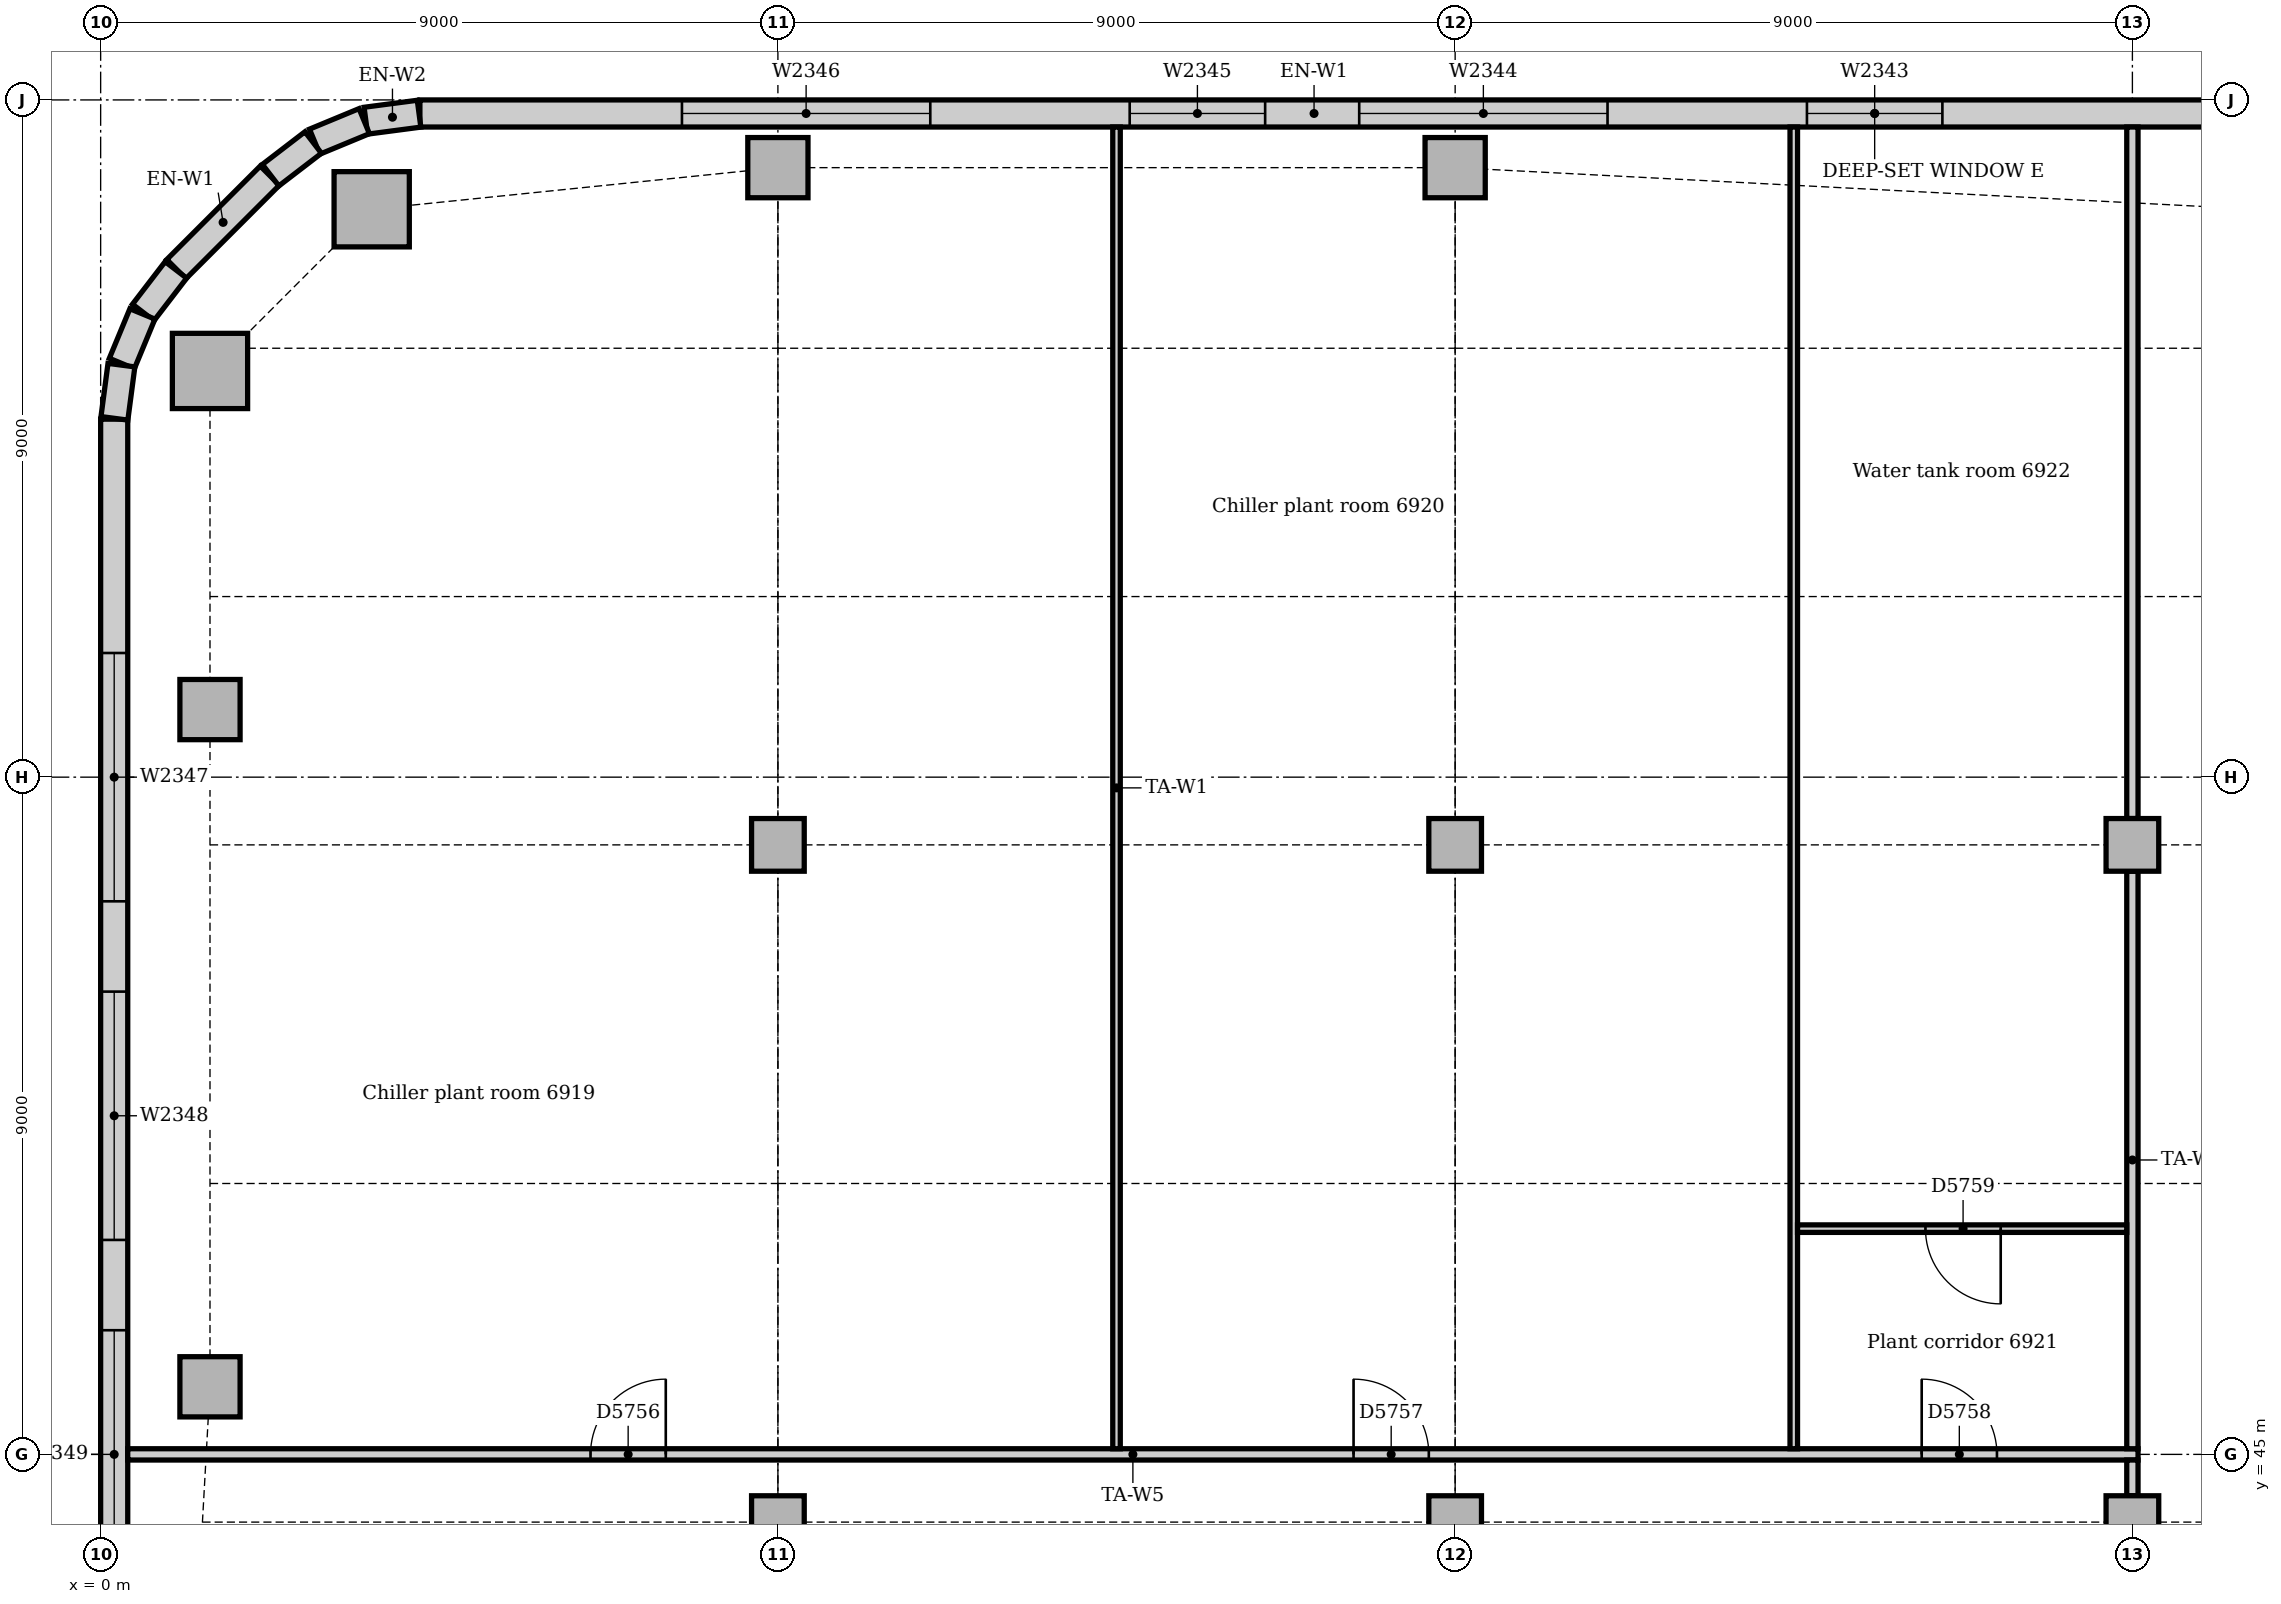
"""IFC4 building model, lengths in metres.
Left out: names, types, materials, properties, quantities, classifications, styles, units other than length and angle.
Written with IfcOpenShell. Run it as: python <this file> out.ifc"""

import sys

from ifc_helpers import new_model, si_unit, direction, frame, frame_2d, origin, origin_2d, place, context, subcontext, project, spatial, rectangle, extrude, element, fill, save


model = new_model("IFC4")
c1 = context("Model", 3, precision=1e-05, world=origin(), true_north=direction((0.0, 1.0)))
c2 = subcontext(c1, "Body", "Model", "MODEL_VIEW")
j1 = project(units=[si_unit("LENGTHUNIT", "METRE"), si_unit("PLANEANGLEUNIT", "RADIAN")], contexts=[c1])
p1 = place(None, origin())
s1 = spatial("IfcSite", under=j1, at=p1, CompositionType="ELEMENT")
p2 = place(p1, origin())
s2 = spatial("IfcBuilding", under=s1, at=p2, CompositionType="ELEMENT")
p3 = place(p2, frame((0.0, 0.0, 291.0)))
s3 = spatial("IfcBuildingStorey", under=s2, at=p3, CompositionType="ELEMENT", Elevation=291.0)
for number, where, z_axis, x_axis in (
    (1, (3.602, 61.547, 0.0), (0.0, 0.0, 1.0), (1.0, 0.0, 0.0)),
    (2, (1.453, 59.398, 0.0), (0.0, 0.0, 1.0), (1.0, 0.0, 0.0)),
):
    element("IfcColumn", number, at=place(p3, frame(where, z_axis=z_axis, x_axis=x_axis)), inside=s3, PredefinedType="COLUMN", context=c2, shape_type="SweptSolid", body=[
        extrude(rectangle(XDim=1.0, YDim=1.0, at=origin_2d()), origin(), (0.0, 0.0, 1.0), 6.55),
    ])
for number, where, z_axis, x_axis in (
    (3, (9.0, 62.1, 0.0), (0.0, 0.0, 1.0), (1.0, 0.0, 0.0)),
    (4, (18.0, 62.1, 0.0), (0.0, 0.0, 1.0), (1.0, 0.0, 0.0)),
    (5, (1.453, 45.898, 0.0), (0.0, 0.0, 1.0), (1.0, 0.0, 0.0)),
    (6, (1.453, 54.898, 0.0), (0.0, 0.0, 1.0), (1.0, 0.0, 0.0)),
):
    element("IfcColumn", number, at=place(p3, frame(where, z_axis=z_axis, x_axis=x_axis)), inside=s3, PredefinedType="COLUMN", context=c2, shape_type="SweptSolid", body=[
        extrude(rectangle(XDim=0.8, YDim=0.8, at=origin_2d()), origin(), (0.0, 0.0, 1.0), 6.55),
    ])
for number, where, z_axis, x_axis in (
    (7, (9.0, 44.1, 0.0), (0.0, 0.0, 1.0), (1.0, 0.0, 0.0)),
    (8, (9.0, 53.1, 0.0), (0.0, 0.0, 1.0), (1.0, 0.0, 0.0)),
    (9, (18.0, 44.1, 0.0), (0.0, 0.0, 1.0), (1.0, 0.0, 0.0)),
    (10, (18.0, 53.1, 0.0), (0.0, 0.0, 1.0), (1.0, 0.0, 0.0)),
    (11, (27.0, 44.1, 0.0), (0.0, 0.0, 1.0), (1.0, 0.0, 0.0)),
    (12, (27.0, 53.1, 0.0), (0.0, 0.0, 1.0), (1.0, 0.0, 0.0)),
):
    element("IfcColumn", number, at=place(p3, frame(where, z_axis=z_axis, x_axis=x_axis)), inside=s3, PredefinedType="COLUMN", context=c2, shape_type="SweptSolid", body=[
        extrude(rectangle(XDim=0.7, YDim=0.7, at=origin_2d()), origin(), (0.0, 0.0, 1.0), 6.55),
    ])
p4 = place(p3, frame((28.007, 62.82, 0.0), z_axis=(0.0, 0.0, 1.0), x_axis=(-1.0, 0.0, 0.0)))
e13 = element("IfcWall", 13, at=p4, inside=s3, PredefinedType="STANDARD", context=c2, shape_type="SweptSolid", body=[
    extrude(rectangle(XDim=23.765, YDim=0.36, at=frame_2d((11.882, 0.0))), origin(), (0.0, 0.0, 1.0), 6.55),
])
p5 = place(p4, frame((3.532, 0.0, 0.9)))
e14 = element("IfcOpeningElement", 14, at=p5, cuts=e13, PredefinedType="OPENING", context=c2, shape_type="SweptSolid", body=[
    extrude(rectangle(XDim=1.8, YDim=2.2, at=frame_2d((0.9, 1.1))), frame((0.0, 0.19, 0.0), z_axis=(0.0, -1.0, 0.0), x_axis=(1.0, 0.0, 0.0)), (0.0, 0.0, 1.0), 0.38),
])
p6 = place(p4, frame((7.982, 0.0, 0.9)))
e15 = element("IfcOpeningElement", 15, at=p6, cuts=e13, PredefinedType="OPENING", context=c2, shape_type="SweptSolid", body=[
    extrude(rectangle(XDim=3.3, YDim=2.2, at=frame_2d((1.65, 1.1))), frame((0.0, 0.19, 0.0), z_axis=(0.0, -1.0, 0.0), x_axis=(1.0, 0.0, 0.0)), (0.0, 0.0, 1.0), 0.38),
])
p7 = place(p4, frame((12.532, 0.0, 0.9)))
e16 = element("IfcOpeningElement", 16, at=p7, cuts=e13, PredefinedType="OPENING", context=c2, shape_type="SweptSolid", body=[
    extrude(rectangle(XDim=1.8, YDim=2.2, at=frame_2d((0.9, 1.1))), frame((0.0, 0.19, 0.0), z_axis=(0.0, -1.0, 0.0), x_axis=(1.0, 0.0, 0.0)), (0.0, 0.0, 1.0), 0.38),
])
p8 = place(p4, frame((16.982, 0.0, 0.9)))
e17 = element("IfcOpeningElement", 17, at=p8, cuts=e13, PredefinedType="OPENING", context=c2, shape_type="SweptSolid", body=[
    extrude(rectangle(XDim=3.3, YDim=2.2, at=frame_2d((1.65, 1.1))), frame((0.0, 0.19, 0.0), z_axis=(0.0, -1.0, 0.0), x_axis=(1.0, 0.0, 0.0)), (0.0, 0.0, 1.0), 0.38),
])
p9 = place(p3, frame((2.249, 61.994, 0.0), z_axis=(0.0, 0.0, 1.0), x_axis=(-0.707106781187, -0.707106781187, 0.0)))
e18 = element("IfcWall", 18, at=p9, inside=s3, PredefinedType="STANDARD", context=c2, shape_type="SweptSolid", body=[
    extrude(rectangle(XDim=1.757, YDim=0.36, at=frame_2d((0.879, 0.0))), origin(), (0.0, 0.0, 1.0), 6.55),
])
p10 = place(p3, frame((0.18, 58.757, 0.0), z_axis=(0.0, 0.0, 1.0), x_axis=(0.0, -1.0, 0.0)))
e19 = element("IfcWall", 19, at=p10, inside=s3, PredefinedType="STANDARD", context=c2, shape_type="SweptSolid", body=[
    extrude(rectangle(XDim=16.757, YDim=0.36, at=frame_2d((8.379, 0.0))), origin(), (0.0, 0.0, 1.0), 6.55),
])
p11 = place(p10, frame((3.107, 0.0, 0.9)))
e20 = element("IfcOpeningElement", 20, at=p11, cuts=e19, PredefinedType="OPENING", context=c2, shape_type="SweptSolid", body=[
    extrude(rectangle(XDim=3.3, YDim=2.2, at=frame_2d((1.65, 1.1))), frame((0.0, 0.19, 0.0), z_axis=(0.0, -1.0, 0.0), x_axis=(1.0, 0.0, 0.0)), (0.0, 0.0, 1.0), 0.38),
])
p12 = place(p10, frame((7.607, 0.0, 0.9)))
e21 = element("IfcOpeningElement", 21, at=p12, cuts=e19, PredefinedType="OPENING", context=c2, shape_type="SweptSolid", body=[
    extrude(rectangle(XDim=3.3, YDim=2.2, at=frame_2d((1.65, 1.1))), frame((0.0, 0.19, 0.0), z_axis=(0.0, -1.0, 0.0), x_axis=(1.0, 0.0, 0.0)), (0.0, 0.0, 1.0), 0.38),
])
p13 = place(p10, frame((12.107, 0.0, 0.9)))
e22 = element("IfcOpeningElement", 22, at=p13, cuts=e19, PredefinedType="OPENING", context=c2, shape_type="SweptSolid", body=[
    extrude(rectangle(XDim=3.3, YDim=2.2, at=frame_2d((1.65, 1.1))), frame((0.0, 0.19, 0.0), z_axis=(0.0, -1.0, 0.0), x_axis=(1.0, 0.0, 0.0)), (0.0, 0.0, 1.0), 0.38),
])
for number, where, z_axis, x_axis in (
    (23, (4.231, 62.817, 0.0), (0.0, 0.0, 1.0), (-0.991, -0.131, 0.0)),
    (24, (3.503, 62.718, 0.0), (0.0, 0.0, 1.0), (-0.924, -0.383, 0.0)),
):
    element("IfcWall", number, at=place(p3, frame(where, z_axis=z_axis, x_axis=x_axis)), inside=s3, PredefinedType="STANDARD", context=c2, shape_type="SweptSolid", body=[
        extrude(rectangle(XDim=0.713, YDim=0.36, at=frame_2d((0.356, 0.0))), origin(), (0.0, 0.0, 1.0), 6.55),
    ])
for number, where, z_axis, x_axis in (
    (25, (2.825, 62.434, 0.0), (0.0, 0.0, 1.0), (-0.793, -0.609, 0.0)),
    (26, (1.0, 60.741, 0.0), (0.0, 0.0, 1.0), (-0.609, -0.793, 0.0)),
):
    element("IfcWall", number, at=place(p3, frame(where, z_axis=z_axis, x_axis=x_axis)), inside=s3, PredefinedType="STANDARD", context=c2, shape_type="SweptSolid", body=[
        extrude(rectangle(XDim=0.713, YDim=0.36, at=frame_2d((0.357, 0.0))), origin(), (0.0, 0.0, 1.0), 6.55),
    ])
for number, where, z_axis, x_axis in (
    (27, (0.555, 60.156, 0.0), (0.0, 0.0, 1.0), (-0.383, -0.924, 0.0)),
    (28, (0.276, 59.476, 0.0), (0.0, 0.0, 1.0), (-0.131, -0.991, 0.0)),
):
    element("IfcWall", number, at=place(p3, frame(where, z_axis=z_axis, x_axis=x_axis)), inside=s3, PredefinedType="STANDARD", context=c2, shape_type="SweptSolid", body=[
        extrude(rectangle(XDim=0.713, YDim=0.36, at=frame_2d((0.356, 0.0))), origin(), (0.0, 0.0, 1.0), 6.55),
    ])
p14 = place(p3, frame((0.36, 45.0, 0.0), z_axis=(0.0, 0.0, 1.0), x_axis=(1.0, 0.0, 0.0)))
e29 = element("IfcWall", 29, at=p14, inside=s3, PredefinedType="PARTITIONING", context=c2, shape_type="SweptSolid", body=[
    extrude(rectangle(XDim=26.715, YDim=0.15, at=frame_2d((13.357, 0.0))), origin(), (0.0, 0.0, 1.0), 6.55),
])
p15 = place(p14, frame((6.15, 0.0, 0.0)))
e30 = element("IfcOpeningElement", 30, at=p15, cuts=e29, PredefinedType="OPENING", context=c2, shape_type="SweptSolid", body=[
    extrude(rectangle(XDim=1.0, YDim=2.1, at=frame_2d((0.5, 1.05))), frame((0.0, 0.085, 0.0), z_axis=(0.0, -1.0, 0.0), x_axis=(1.0, 0.0, 0.0)), (0.0, 0.0, 1.0), 0.17),
])
p16 = place(p14, frame((16.29, 0.0, 0.0)))
e31 = element("IfcOpeningElement", 31, at=p16, cuts=e29, PredefinedType="OPENING", context=c2, shape_type="SweptSolid", body=[
    extrude(rectangle(XDim=1.0, YDim=2.1, at=frame_2d((0.5, 1.05))), frame((0.0, 0.085, 0.0), z_axis=(0.0, -1.0, 0.0), x_axis=(1.0, 0.0, 0.0)), (0.0, 0.0, 1.0), 0.17),
])
p17 = place(p14, frame((23.84, 0.0, 0.0)))
e32 = element("IfcOpeningElement", 32, at=p17, cuts=e29, PredefinedType="OPENING", context=c2, shape_type="SweptSolid", body=[
    extrude(rectangle(XDim=1.0, YDim=2.1, at=frame_2d((0.5, 1.05))), frame((0.0, 0.085, 0.0), z_axis=(0.0, -1.0, 0.0), x_axis=(1.0, 0.0, 0.0)), (0.0, 0.0, 1.0), 0.17),
])
p18 = place(p3, frame((27.0, 44.45, 0.0), z_axis=(0.0, 0.0, 1.0), x_axis=(0.0, 1.0, 0.0)))
e33 = element("IfcWall", 33, at=p18, inside=s3, PredefinedType="PARTITIONING", context=c2, shape_type="SweptSolid", body=[
    extrude(rectangle(XDim=0.475, YDim=0.15, at=frame_2d((0.237, 0.0))), origin(), (0.0, 0.0, 1.0), 6.55),
])
p19 = place(p3, frame((27.0, 45.075, 0.0), z_axis=(0.0, 0.0, 1.0), x_axis=(0.0, 1.0, 0.0)))
e34 = element("IfcWall", 34, at=p19, inside=s3, PredefinedType="PARTITIONING", context=c2, shape_type="SweptSolid", body=[
    extrude(rectangle(XDim=7.675, YDim=0.15, at=frame_2d((3.837, 0.0))), origin(), (0.0, 0.0, 1.0), 6.1),
])
p20 = place(p3, frame((27.0, 53.45, 0.0), z_axis=(0.0, 0.0, 1.0), x_axis=(0.0, 1.0, 0.0)))
e35 = element("IfcWall", 35, at=p20, inside=s3, PredefinedType="PARTITIONING", context=c2, shape_type="SweptSolid", body=[
    extrude(rectangle(XDim=9.19, YDim=0.15, at=frame_2d((4.595, 0.0))), origin(), (0.0, 0.0, 1.0), 6.1),
])
for number, where, z_axis, x_axis in (
    (36, (13.5, 45.075, 0.0), (0.0, 0.0, 1.0), (0.0, 1.0, 0.0)),
    (37, (22.5, 45.075, 0.0), (0.0, 0.0, 1.0), (0.0, 1.0, 0.0)),
):
    element("IfcWall", number, at=place(p3, frame(where, z_axis=z_axis, x_axis=x_axis)), inside=s3, PredefinedType="PARTITIONING", context=c2, shape_type="SweptSolid", body=[
        extrude(rectangle(XDim=17.565, YDim=0.1, at=frame_2d((8.783, 0.0))), origin(), (0.0, 0.0, 1.0), 6.55),
    ])
p21 = place(p3, frame((22.55, 48.0, 0.0), z_axis=(0.0, 0.0, 1.0), x_axis=(1.0, 0.0, 0.0)))
e38 = element("IfcWall", 38, at=p21, inside=s3, PredefinedType="PARTITIONING", context=c2, shape_type="SweptSolid", body=[
    extrude(rectangle(XDim=4.375, YDim=0.1, at=frame_2d((2.188, 0.0))), origin(), (0.0, 0.0, 1.0), 6.55),
])
p22 = place(p21, frame((1.7, 0.0, 0.0)))
e39 = element("IfcOpeningElement", 39, at=p22, cuts=e38, PredefinedType="OPENING", context=c2, shape_type="SweptSolid", body=[
    extrude(rectangle(XDim=1.0, YDim=2.1, at=frame_2d((0.5, 1.05))), frame((0.0, 0.06, 0.0), z_axis=(0.0, -1.0, 0.0), x_axis=(1.0, 0.0, 0.0)), (0.0, 0.0, 1.0), 0.12),
])
p23 = place(p5, origin())
e40 = element("IfcWindow", 40, at=p23, inside=s3, PartitioningType="SINGLE_PANEL", PredefinedType="WINDOW", context=c2, shape_type="SweptSolid", body=[
    extrude(rectangle(XDim=1.8, YDim=2.2, at=frame_2d((0.9, 1.1))), frame((0.0, 0.13, 0.0), z_axis=(0.0, -1.0, 0.0), x_axis=(1.0, 0.0, 0.0)), (0.0, 0.0, 1.0), 0.06),
])
fill(e14, e40)
p24 = place(p6, origin())
e41 = element("IfcWindow", 41, at=p24, inside=s3, PartitioningType="SINGLE_PANEL", PredefinedType="WINDOW", context=c2, shape_type="SweptSolid", body=[
    extrude(rectangle(XDim=3.3, YDim=2.2, at=frame_2d((1.65, 1.1))), frame((0.0, 0.13, 0.0), z_axis=(0.0, -1.0, 0.0), x_axis=(1.0, 0.0, 0.0)), (0.0, 0.0, 1.0), 0.06),
])
fill(e15, e41)
p25 = place(p7, origin())
e42 = element("IfcWindow", 42, at=p25, inside=s3, PartitioningType="SINGLE_PANEL", PredefinedType="WINDOW", context=c2, shape_type="SweptSolid", body=[
    extrude(rectangle(XDim=1.8, YDim=2.2, at=frame_2d((0.9, 1.1))), frame((0.0, 0.13, 0.0), z_axis=(0.0, -1.0, 0.0), x_axis=(1.0, 0.0, 0.0)), (0.0, 0.0, 1.0), 0.06),
])
fill(e16, e42)
p26 = place(p8, origin())
e43 = element("IfcWindow", 43, at=p26, inside=s3, PartitioningType="SINGLE_PANEL", PredefinedType="WINDOW", context=c2, shape_type="SweptSolid", body=[
    extrude(rectangle(XDim=3.3, YDim=2.2, at=frame_2d((1.65, 1.1))), frame((0.0, 0.13, 0.0), z_axis=(0.0, -1.0, 0.0), x_axis=(1.0, 0.0, 0.0)), (0.0, 0.0, 1.0), 0.06),
])
fill(e17, e43)
p27 = place(p11, origin())
e44 = element("IfcWindow", 44, at=p27, inside=s3, PartitioningType="SINGLE_PANEL", PredefinedType="WINDOW", context=c2, shape_type="SweptSolid", body=[
    extrude(rectangle(XDim=3.3, YDim=2.2, at=frame_2d((1.65, 1.1))), frame((0.0, 0.13, 0.0), z_axis=(0.0, -1.0, 0.0), x_axis=(1.0, 0.0, 0.0)), (0.0, 0.0, 1.0), 0.06),
])
fill(e20, e44)
p28 = place(p12, origin())
e45 = element("IfcWindow", 45, at=p28, inside=s3, PartitioningType="SINGLE_PANEL", PredefinedType="WINDOW", context=c2, shape_type="SweptSolid", body=[
    extrude(rectangle(XDim=3.3, YDim=2.2, at=frame_2d((1.65, 1.1))), frame((0.0, 0.13, 0.0), z_axis=(0.0, -1.0, 0.0), x_axis=(1.0, 0.0, 0.0)), (0.0, 0.0, 1.0), 0.06),
])
fill(e21, e45)
p29 = place(p13, origin())
e46 = element("IfcWindow", 46, at=p29, inside=s3, PartitioningType="SINGLE_PANEL", PredefinedType="WINDOW", context=c2, shape_type="SweptSolid", body=[
    extrude(rectangle(XDim=3.3, YDim=2.2, at=frame_2d((1.65, 1.1))), frame((0.0, 0.13, 0.0), z_axis=(0.0, -1.0, 0.0), x_axis=(1.0, 0.0, 0.0)), (0.0, 0.0, 1.0), 0.06),
])
fill(e22, e46)
p30 = place(p15, origin())
e47 = element("IfcDoor", 47, at=p30, inside=s3, OperationType="SINGLE_SWING_RIGHT", PredefinedType="DOOR", context=c2, shape_type="SweptSolid", body=[
    extrude(rectangle(XDim=1.0, YDim=2.1, at=frame_2d((0.5, 1.05))), frame((0.0, 0.025, 0.0), z_axis=(0.0, -1.0, 0.0), x_axis=(1.0, 0.0, 0.0)), (0.0, 0.0, 1.0), 0.05),
])
fill(e30, e47)
p31 = place(p16, origin())
e48 = element("IfcDoor", 48, at=p31, inside=s3, OperationType="SINGLE_SWING_LEFT", PredefinedType="DOOR", context=c2, shape_type="SweptSolid", body=[
    extrude(rectangle(XDim=1.0, YDim=2.1, at=frame_2d((0.5, 1.05))), frame((0.0, 0.025, 0.0), z_axis=(0.0, -1.0, 0.0), x_axis=(1.0, 0.0, 0.0)), (0.0, 0.0, 1.0), 0.05),
])
fill(e31, e48)
p32 = place(p17, origin())
e49 = element("IfcDoor", 49, at=p32, inside=s3, OperationType="SINGLE_SWING_LEFT", PredefinedType="DOOR", context=c2, shape_type="SweptSolid", body=[
    extrude(rectangle(XDim=1.0, YDim=2.1, at=frame_2d((0.5, 1.05))), frame((0.0, 0.025, 0.0), z_axis=(0.0, -1.0, 0.0), x_axis=(1.0, 0.0, 0.0)), (0.0, 0.0, 1.0), 0.05),
])
fill(e32, e49)
p33 = place(p22, frame((1.0, 0.0, 0.0), z_axis=(0.0, 0.0, 1.0), x_axis=(-1.0, 0.0, 0.0)))
e50 = element("IfcDoor", 50, at=p33, inside=s3, OperationType="SINGLE_SWING_LEFT", PredefinedType="DOOR", context=c2, shape_type="SweptSolid", body=[
    extrude(rectangle(XDim=1.0, YDim=2.1, at=frame_2d((0.5, 1.05))), frame((0.0, 0.025, 0.0), z_axis=(0.0, -1.0, 0.0), x_axis=(1.0, 0.0, 0.0)), (0.0, 0.0, 1.0), 0.05),
])
fill(e39, e50)
save(model, sys.argv[1])
